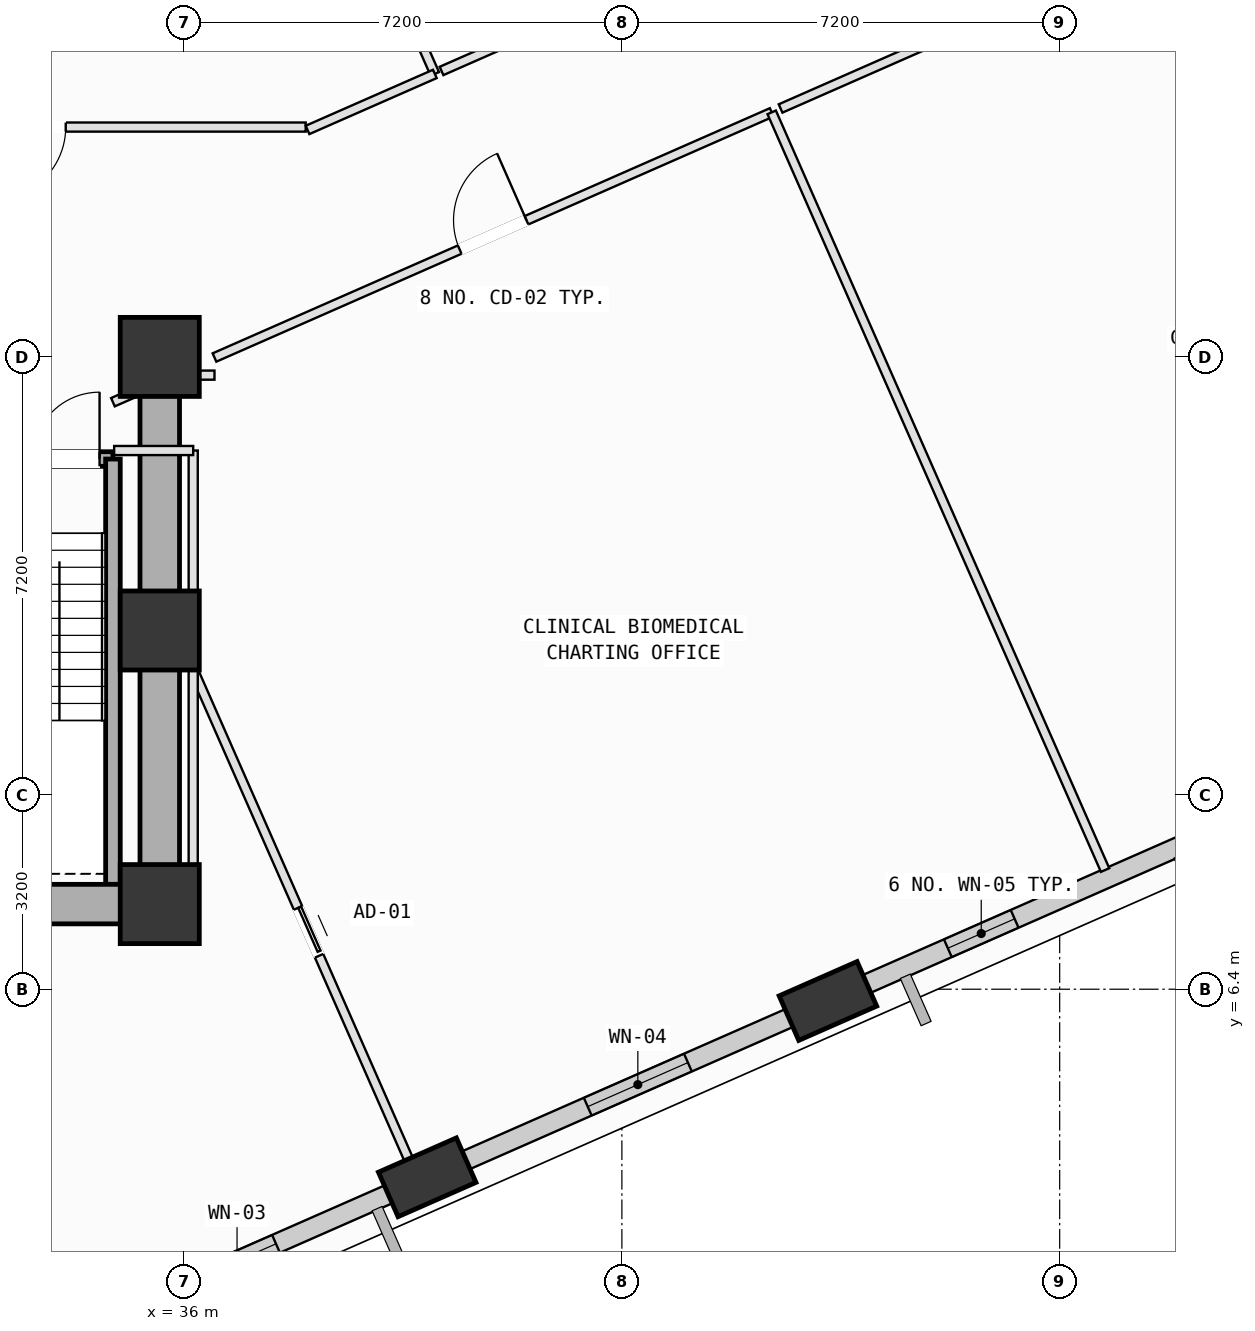
"""IFC4 building model, lengths in metres.
Left out: names, types, materials, properties, quantities, classifications, styles, units other than length and angle.
Written with IfcOpenShell. Run it as: python <this file> out.ifc"""

import sys

from ifc_helpers import new_model, si_unit, direction, frame, frame_2d, origin, origin_2d, place, context, subcontext, project, spatial, rectangle, extrude, element, fill, save


model = new_model("IFC4")
c1 = context("Model", 3, precision=1e-05, world=origin(), true_north=direction((0.0, 1.0)))
c2 = subcontext(c1, "Body", "Model", "MODEL_VIEW")
j1 = project(units=[si_unit("LENGTHUNIT", "METRE"), si_unit("PLANEANGLEUNIT", "RADIAN")], contexts=[c1])
p1 = place(None, origin())
s1 = spatial("IfcSite", under=j1, at=p1, CompositionType="ELEMENT")
p2 = place(p1, origin())
s2 = spatial("IfcBuilding", under=s1, at=p2, CompositionType="ELEMENT")
p3 = place(p2, frame((0.0, 0.0, 124.4)))
s3 = spatial("IfcBuildingStorey", under=s2, at=p3, CompositionType="ELEMENT", Elevation=124.4)
for number, where, z_axis, x_axis in (
    (1, (35.6, 7.8, 0.0), (0.0, 0.0, 1.0), (1.0, 0.0, 0.0)),
    (2, (35.6, 12.3, 0.0), (0.0, 0.0, 1.0), (1.0, 0.0, 0.0)),
    (3, (35.6, 16.8, 0.0), (0.0, 0.0, 1.0), (1.0, 0.0, 0.0)),
):
    element("IfcColumn", number, at=place(p3, frame(where, z_axis=z_axis, x_axis=x_axis)), inside=s3, PredefinedType="COLUMN", context=c2, shape_type="SweptSolid", body=[
        extrude(rectangle(XDim=1.3, YDim=1.3, at=origin_2d()), origin(), (0.0, 0.0, 1.0), 4.0),
    ])
p4 = place(p3, frame((39.998, 3.307, 0.002), z_axis=(0.088505859742, 0.027129631234, 0.995706129287), x_axis=(-0.651659272481, 0.757595016818, 0.037282476875)))
e4 = element("IfcColumn", 4, at=p4, inside=s3, PredefinedType="COLUMN", context=c2, shape_type="SweptSolid", body=[
    extrude(rectangle(XDim=1.4, YDim=0.8, at=origin_2d()), origin(), (0.0, 0.0, 1.0), 4.014),
])
p5 = place(p3, frame((46.589, 6.207, 0.002), z_axis=(0.076271906054, 0.054254019298, 0.995609912434), x_axis=(-0.857296932846, 0.513440266916, 0.037696965954)))
e5 = element("IfcColumn", 5, at=p5, inside=s3, PredefinedType="COLUMN", context=c2, shape_type="SweptSolid", body=[
    extrude(rectangle(XDim=1.4, YDim=0.8, at=origin_2d()), origin(), (0.0, 0.0, 1.0), 4.014),
])
p6 = place(p3, frame((39.713, 3.181, 0.0), z_axis=(0.0, 0.0, 1.0), x_axis=(-0.915316770327, -0.402734664461, 0.0)))
e6 = element("IfcWall", 6, at=p6, inside=s3, PredefinedType="SOLIDWALL", context=c2, shape_type="SweptSolid", body=[
    extrude(rectangle(XDim=6.214, YDim=0.32, at=frame_2d((3.107, 0.0))), origin(), (0.0, 0.0, 1.0), 3.165),
])
p7 = place(p6, frame((2.406, 0.0, 0.75)))
e7 = element("IfcOpeningElement", 7, at=p7, cuts=e6, PredefinedType="OPENING", context=c2, shape_type="SweptSolid", body=[
    extrude(rectangle(XDim=1.4, YDim=1.85, at=frame_2d((0.7, 0.925))), frame((0.0, 0.17, 0.0), z_axis=(0.0, -1.0, 0.0), x_axis=(1.0, 0.0, 0.0)), (0.0, 0.0, 1.0), 0.34),
])
p8 = place(p3, frame((46.304, 6.081, 0.0), z_axis=(0.0, 0.0, 1.0), x_axis=(-0.915319670792, -0.402728072354, 0.0)))
e8 = element("IfcWall", 8, at=p8, inside=s3, PredefinedType="SOLIDWALL", context=c2, shape_type="SweptSolid", body=[
    extrude(rectangle(XDim=6.209, YDim=0.32, at=frame_2d((3.104, 0.0))), origin(), (0.0, 0.0, 1.0), 3.165),
])
p9 = place(p8, frame((2.205, 0.0, 0.75)))
e9 = element("IfcOpeningElement", 9, at=p9, cuts=e8, PredefinedType="OPENING", context=c2, shape_type="SweptSolid", body=[
    extrude(rectangle(XDim=1.8, YDim=2.05, at=frame_2d((0.9, 1.025))), frame((0.0, 0.17, 0.0), z_axis=(0.0, -1.0, 0.0), x_axis=(1.0, 0.0, 0.0)), (0.0, 0.0, 1.0), 0.34),
])
p10 = place(p3, frame((52.902, 8.984, 0.0), z_axis=(0.0, 0.0, 1.0), x_axis=(-0.915310979882, -0.40274782446, 0.0)))
e10 = element("IfcWall", 10, at=p10, inside=s3, PredefinedType="SOLIDWALL", context=c2, shape_type="SweptSolid", body=[
    extrude(rectangle(XDim=6.218, YDim=0.32, at=frame_2d((3.109, 0.0))), origin(), (0.0, 0.0, 1.0), 3.165),
])
p11 = place(p10, frame((3.542, 0.0, 0.75)))
e11 = element("IfcOpeningElement", 11, at=p11, cuts=e10, PredefinedType="OPENING", context=c2, shape_type="SweptSolid", body=[
    extrude(rectangle(XDim=1.2, YDim=1.75, at=frame_2d((0.6, 0.875))), frame((0.0, 0.17, 0.0), z_axis=(0.0, -1.0, 0.0), x_axis=(1.0, 0.0, 0.0)), (0.0, 0.0, 1.0), 0.34),
])
p12 = place(p3, frame((28.611, 21.13, 0.0), z_axis=(0.0, 0.0, 1.0), x_axis=(0.915312012357, 0.402745477981, 0.0)))
e12 = element("IfcWall", 12, at=p12, inside=s3, PredefinedType="SOLIDWALL", context=c2, shape_type="SweptSolid", body=[
    extrude(rectangle(XDim=5.96, YDim=0.32, at=frame_2d((2.98, 0.0))), origin(), (0.0, 0.0, 1.0), 3.165),
])
p13 = place(p3, frame((31.37, 15.12, 0.0), z_axis=(0.0, 0.0, 1.0), x_axis=(1.0, 0.0, 0.0)))
e13 = element("IfcWall", 13, at=p13, inside=s3, PredefinedType="SOLIDWALL", context=c2, shape_type="SweptSolid", body=[
    extrude(rectangle(XDim=3.46, YDim=0.24, at=frame_2d((1.73, 0.0))), origin(), (0.0, 0.0, 1.0), 3.78),
])
p14 = place(p13, frame((2.14, 0.0, 0.0)))
e14 = element("IfcOpeningElement", 14, at=p14, cuts=e13, PredefinedType="OPENING", context=c2, shape_type="SweptSolid", body=[
    extrude(rectangle(XDim=1.1, YDim=2.15, at=frame_2d((0.55, 1.075))), frame((0.0, 0.13, 0.0), z_axis=(0.0, -1.0, 0.0), x_axis=(1.0, 0.0, 0.0)), (0.0, 0.0, 1.0), 0.26),
])
p15 = place(p3, frame((34.83, 15.12, 0.0), z_axis=(0.0, 0.0, 1.0), x_axis=(0.0, -1.0, 0.0)))
e15 = element("IfcWall", 15, at=p15, inside=s3, PredefinedType="SOLIDWALL", context=c2, shape_type="SweptSolid", body=[
    extrude(rectangle(XDim=6.995, YDim=0.24, at=frame_2d((3.498, 0.0))), origin(), (0.0, 0.0, 1.0), 3.78),
])
p16 = place(p3, frame((24.8, 7.8, 0.0), z_axis=(0.0, 0.0, 1.0), x_axis=(1.0, 0.0, 0.0)))
e16 = element("IfcWall", 16, at=p16, inside=s3, PredefinedType="SHEAR", context=c2, shape_type="SweptSolid", body=[
    extrude(rectangle(XDim=10.8, YDim=0.65, at=frame_2d((5.4, 0.0))), origin(), (0.0, 0.0, 1.0), 3.78),
])
p17 = place(p3, frame((35.6, 7.8, 0.0), z_axis=(0.0, 0.0, 1.0), x_axis=(0.0, 1.0, 0.0)))
e17 = element("IfcWall", 17, at=p17, inside=s3, PredefinedType="SHEAR", context=c2, shape_type="SweptSolid", body=[
    extrude(rectangle(XDim=9.0, YDim=0.65, at=frame_2d((4.5, 0.0))), origin(), (0.0, 0.0, 1.0), 3.78),
])
p18 = place(p3, frame((36.15, 11.655, 0.0), z_axis=(0.0, 0.0, 1.0), x_axis=(0.402742956565, -0.915313121799, 0.0)))
e18 = element("IfcWall", 18, at=p18, inside=s3, PredefinedType="PARTITIONING", context=c2, shape_type="SweptSolid", body=[
    extrude(rectangle(XDim=9.421, YDim=0.15, at=frame_2d((4.71, 0.0))), origin(), (0.0, 0.0, 1.0), 3.78),
])
p19 = place(p18, frame((4.281, 0.0, 0.0)))
e19 = element("IfcOpeningElement", 19, at=p19, cuts=e18, PredefinedType="OPENING", context=c2, shape_type="SweptSolid", body=[
    extrude(rectangle(XDim=0.86, YDim=2.06, at=frame_2d((0.43, 1.03))), frame((0.0, 0.085, 0.0), z_axis=(0.0, -1.0, 0.0), x_axis=(1.0, 0.0, 0.0)), (0.0, 0.0, 1.0), 0.17),
])
p20 = place(p3, frame((35.6, 7.5, 0.0), z_axis=(0.0, 0.0, 1.0), x_axis=(1.0, 0.0, 0.0)))
e20 = element("IfcWall", 20, at=p20, inside=s3, PredefinedType="PARTITIONING", context=c2, shape_type="SweptSolid", body=[
    extrude(rectangle(XDim=0.55, YDim=0.15, at=frame_2d((0.275, 0.0))), origin(), (0.0, 0.0, 1.0), 2.965),
])
p21 = place(p3, frame((36.15, 7.5, 0.0), z_axis=(0.0, 0.0, 1.0), x_axis=(0.0, 1.0, 0.0)))
e21 = element("IfcWall", 21, at=p21, inside=s3, PredefinedType="PARTITIONING", context=c2, shape_type="SweptSolid", body=[
    extrude(rectangle(XDim=4.155, YDim=0.15, at=frame_2d((2.078, 0.0))), origin(), (0.0, 0.0, 1.0), 3.78),
])
p22 = place(p3, frame((34.83, 16.055, 0.0), z_axis=(0.0, 0.0, 1.0), x_axis=(0.915380147415, 0.402590593182, 0.0)))
e22 = element("IfcWall", 22, at=p22, inside=s3, PredefinedType="PARTITIONING", context=c2, shape_type="SweptSolid", body=[
    extrude(rectangle(XDim=1.105, YDim=0.15, at=frame_2d((0.553, 0.0))), origin(), (0.0, 0.0, 1.0), 2.945),
])
p23 = place(p3, frame((35.842, 16.5, 0.0), z_axis=(0.0, 0.0, 1.0), x_axis=(1.0, 0.0, 0.0)))
e23 = element("IfcWall", 23, at=p23, inside=s3, PredefinedType="PARTITIONING", context=c2, shape_type="SweptSolid", body=[
    extrude(rectangle(XDim=0.658, YDim=0.15, at=frame_2d((0.329, 0.0))), origin(), (0.0, 0.0, 1.0), 2.965),
])
p24 = place(p3, frame((36.5, 16.79, 0.0), z_axis=(0.0, 0.0, 1.0), x_axis=(0.915322583173, 0.402721453034, 0.0)))
e24 = element("IfcWall", 24, at=p24, inside=s3, PredefinedType="PARTITIONING", context=c2, shape_type="SweptSolid", body=[
    extrude(rectangle(XDim=10.012, YDim=0.15, at=frame_2d((5.006, 0.0))), origin(), (0.0, 0.0, 1.0), 2.965),
])
p25 = place(p24, frame((4.406, 0.0, 0.0)))
e25 = element("IfcOpeningElement", 25, at=p25, cuts=e24, PredefinedType="OPENING", context=c2, shape_type="SweptSolid", body=[
    extrude(rectangle(XDim=1.2, YDim=2.15, at=frame_2d((0.6, 1.075))), frame((0.0, 0.085, 0.0), z_axis=(0.0, -1.0, 0.0), x_axis=(1.0, 0.0, 0.0)), (0.0, 0.0, 1.0), 0.17),
])
p26 = place(p3, frame((45.664, 20.822, 0.0), z_axis=(0.0, 0.0, 1.0), x_axis=(0.402718182195, -0.915324022262, 0.0)))
e26 = element("IfcWall", 26, at=p26, inside=s3, PredefinedType="PARTITIONING", context=c2, shape_type="SweptSolid", body=[
    extrude(rectangle(XDim=13.615, YDim=0.15, at=frame_2d((6.807, 0.0))), origin(), (0.0, 0.0, 1.0), 3.78),
])
p27 = place(p3, frame((47.302, 6.269, 0.0), z_axis=(0.0, 0.0, 1.0), x_axis=(-0.915413318448, -0.402515162954, 0.0)))
e27 = element("IfcWall", 27, at=p27, inside=s3, PredefinedType="PARTITIONING", context=c2, shape_type="SweptSolid", body=[
    extrude(rectangle(XDim=0.989, YDim=0.15, at=frame_2d((0.494, 0.0))), origin(), (0.0, 0.0, 1.0), 3.165),
])
p28 = place(p3, frame((40.714, 3.37, 0.0), z_axis=(0.0, 0.0, 1.0), x_axis=(-0.915299166076, -0.402774672219, 0.0)))
e28 = element("IfcWall", 28, at=p28, inside=s3, PredefinedType="PARTITIONING", context=c2, shape_type="SweptSolid", body=[
    extrude(rectangle(XDim=0.681, YDim=0.15, at=frame_2d((0.34, 0.0))), origin(), (0.0, 0.0, 1.0), 3.165),
])
p29 = place(p3, frame((36.15, 12.052, 0.0), z_axis=(0.0, 0.0, 1.0), x_axis=(0.0, 1.0, 0.0)))
e29 = element("IfcWall", 29, at=p29, inside=s3, PredefinedType="PARTITIONING", context=c2, shape_type="SweptSolid", body=[
    extrude(rectangle(XDim=3.208, YDim=0.15, at=frame_2d((1.604, 0.0))), origin(), (0.0, 0.0, 1.0), 3.78),
])
p30 = place(p3, frame((36.15, 15.26, 0.0), z_axis=(0.0, 0.0, 1.0), x_axis=(-1.0, 0.0, 0.0)))
e30 = element("IfcWall", 30, at=p30, inside=s3, PredefinedType="PARTITIONING", context=c2, shape_type="SweptSolid", body=[
    extrude(rectangle(XDim=1.3, YDim=0.15, at=frame_2d((0.65, 0.0))), origin(), (0.0, 0.0, 1.0), 3.78),
])
p31 = place(p3, frame((45.81, 20.886, 0.0), z_axis=(0.0, 0.0, 1.0), x_axis=(0.915307973906, 0.402754655969, 0.0)))
e31 = element("IfcWall", 31, at=p31, inside=s3, PredefinedType="PARTITIONING", context=c2, shape_type="SweptSolid", body=[
    extrude(rectangle(XDim=12.24, YDim=0.15, at=frame_2d((6.12, 0.0))), origin(), (0.0, 0.0, 1.0), 3.78),
])
p32 = place(p31, frame((5.52, 0.0, 0.0)))
e32 = element("IfcOpeningElement", 32, at=p32, cuts=e31, PredefinedType="OPENING", context=c2, shape_type="SweptSolid", body=[
    extrude(rectangle(XDim=1.2, YDim=2.15, at=frame_2d((0.6, 1.075))), frame((0.0, 0.085, 0.0), z_axis=(0.0, -1.0, 0.0), x_axis=(1.0, 0.0, 0.0)), (0.0, 0.0, 1.0), 0.17),
])
p33 = place(p3, frame((38.0, 20.58, 0.0), z_axis=(0.0, 0.0, 1.0), x_axis=(-1.0, 0.0, 0.0)))
e33 = element("IfcWall", 33, at=p33, inside=s3, PredefinedType="PARTITIONING", context=c2, shape_type="SweptSolid", body=[
    extrude(rectangle(XDim=9.093, YDim=0.15, at=frame_2d((4.546, 0.0))), origin(), (0.0, 0.0, 1.0), 3.365),
])
p34 = place(p33, frame((3.947, 0.0, 0.0)))
e34 = element("IfcOpeningElement", 34, at=p34, cuts=e33, PredefinedType="OPENING", context=c2, shape_type="SweptSolid", body=[
    extrude(rectangle(XDim=1.2, YDim=2.15, at=frame_2d((0.6, 1.075))), frame((0.0, 0.085, 0.0), z_axis=(0.0, -1.0, 0.0), x_axis=(1.0, 0.0, 0.0)), (0.0, 0.0, 1.0), 0.17),
])
p35 = place(p3, frame((28.43, 21.651, 0.0), z_axis=(0.0, 0.0, 1.0), x_axis=(0.915314693601, 0.402739384314, 0.0)))
e35 = element("IfcWall", 35, at=p35, inside=s3, PredefinedType="PARTITIONING", context=c2, shape_type="SweptSolid", body=[
    extrude(rectangle(XDim=10.625, YDim=0.15, at=frame_2d((5.312, 0.0))), origin(), (0.0, 0.0, 1.0), 3.78),
])
p36 = place(p3, frame((38.431, 25.303, 0.0), z_axis=(0.0, 0.0, 1.0), x_axis=(0.402660781554, -0.915349274866, 0.0)))
e36 = element("IfcWall", 36, at=p36, inside=s3, PredefinedType="PARTITIONING", context=c2, shape_type="SweptSolid", body=[
    extrude(rectangle(XDim=4.205, YDim=0.15, at=frame_2d((2.103, 0.0))), origin(), (0.0, 0.0, 1.0), 3.78),
])
p37 = place(p3, frame((40.124, 21.454, 0.0), z_axis=(0.0, 0.0, 1.0), x_axis=(-0.915349649127, -0.402659930763, 0.0)))
e37 = element("IfcWall", 37, at=p37, inside=s3, PredefinedType="PARTITIONING", context=c2, shape_type="SweptSolid", body=[
    extrude(rectangle(XDim=2.288, YDim=0.15, at=frame_2d((1.144, 0.0))), origin(), (0.0, 0.0, 1.0), 3.78),
])
p38 = place(p3, frame((55.739, 28.326, 0.0), z_axis=(0.0, 0.0, 1.0), x_axis=(-0.915298880847, -0.402775320396, 0.0)))
e38 = element("IfcWall", 38, at=p38, inside=s3, PredefinedType="PARTITIONING", context=c2, shape_type="SweptSolid", body=[
    extrude(rectangle(XDim=16.94, YDim=0.15, at=frame_2d((8.47, 0.0))), origin(), (0.0, 0.0, 1.0), 2.945),
])
p39 = place(p38, frame((7.87, 0.0, 0.0)))
e39 = element("IfcOpeningElement", 39, at=p39, cuts=e38, PredefinedType="OPENING", context=c2, shape_type="SweptSolid", body=[
    extrude(rectangle(XDim=1.2, YDim=2.15, at=frame_2d((0.6, 1.075))), frame((0.0, 0.085, 0.0), z_axis=(0.0, -1.0, 0.0), x_axis=(1.0, 0.0, 0.0)), (0.0, 0.0, 1.0), 0.17),
])
p40 = place(p7, origin())
e40 = element("IfcWindow", 40, at=p40, inside=s3, PartitioningType="SINGLE_PANEL", PredefinedType="WINDOW", context=c2, shape_type="SweptSolid", body=[
    extrude(rectangle(XDim=1.4, YDim=1.85, at=frame_2d((0.7, 0.925))), frame((0.0, 0.03, 0.0), z_axis=(0.0, -1.0, 0.0), x_axis=(1.0, 0.0, 0.0)), (0.0, 0.0, 1.0), 0.06),
])
fill(e7, e40)
p41 = place(p9, origin())
e41 = element("IfcWindow", 41, at=p41, inside=s3, PartitioningType="SINGLE_PANEL", PredefinedType="WINDOW", context=c2, shape_type="SweptSolid", body=[
    extrude(rectangle(XDim=1.8, YDim=2.05, at=frame_2d((0.9, 1.025))), frame((0.0, 0.03, 0.0), z_axis=(0.0, -1.0, 0.0), x_axis=(1.0, 0.0, 0.0)), (0.0, 0.0, 1.0), 0.06),
])
fill(e9, e41)
p42 = place(p11, origin())
e42 = element("IfcWindow", 42, at=p42, inside=s3, PartitioningType="SINGLE_PANEL", PredefinedType="WINDOW", context=c2, shape_type="SweptSolid", body=[
    extrude(rectangle(XDim=1.2, YDim=1.75, at=frame_2d((0.6, 0.875))), frame((0.0, 0.03, 0.0), z_axis=(0.0, -1.0, 0.0), x_axis=(1.0, 0.0, 0.0)), (0.0, 0.0, 1.0), 0.06),
])
fill(e11, e42)
p43 = place(p14, origin())
e43 = element("IfcDoor", 43, at=p43, inside=s3, OperationType="SINGLE_SWING_RIGHT", PredefinedType="DOOR", context=c2, shape_type="SweptSolid", body=[
    extrude(rectangle(XDim=1.1, YDim=2.15, at=frame_2d((0.55, 1.075))), frame((0.0, 0.025, 0.0), z_axis=(0.0, -1.0, 0.0), x_axis=(1.0, 0.0, 0.0)), (0.0, 0.0, 1.0), 0.05),
])
fill(e14, e43)
p44 = place(p25, origin())
e44 = element("IfcDoor", 44, at=p44, inside=s3, OperationType="SINGLE_SWING_RIGHT", PredefinedType="DOOR", context=c2, shape_type="SweptSolid", body=[
    extrude(rectangle(XDim=1.2, YDim=2.15, at=frame_2d((0.6, 1.075))), frame((0.0, 0.025, 0.0), z_axis=(0.0, -1.0, 0.0), x_axis=(1.0, 0.0, 0.0)), (0.0, 0.0, 1.0), 0.05),
])
fill(e25, e44)
p45 = place(p34, origin())
e45 = element("IfcDoor", 45, at=p45, inside=s3, OperationType="SINGLE_SWING_RIGHT", PredefinedType="DOOR", context=c2, shape_type="SweptSolid", body=[
    extrude(rectangle(XDim=1.2, YDim=2.15, at=frame_2d((0.6, 1.075))), frame((0.0, 0.025, 0.0), z_axis=(0.0, -1.0, 0.0), x_axis=(1.0, 0.0, 0.0)), (0.0, 0.0, 1.0), 0.05),
])
fill(e34, e45)
p46 = place(p19, origin())
e46 = element("IfcDoor", 46, at=p46, inside=s3, OperationType="SLIDING_TO_LEFT", PredefinedType="DOOR", context=c2, shape_type="SweptSolid", body=[
    extrude(rectangle(XDim=0.86, YDim=2.06, at=frame_2d((0.43, 1.03))), frame((0.0, 0.025, 0.0), z_axis=(0.0, -1.0, 0.0), x_axis=(1.0, 0.0, 0.0)), (0.0, 0.0, 1.0), 0.05),
])
fill(e19, e46)
save(model, sys.argv[1])
